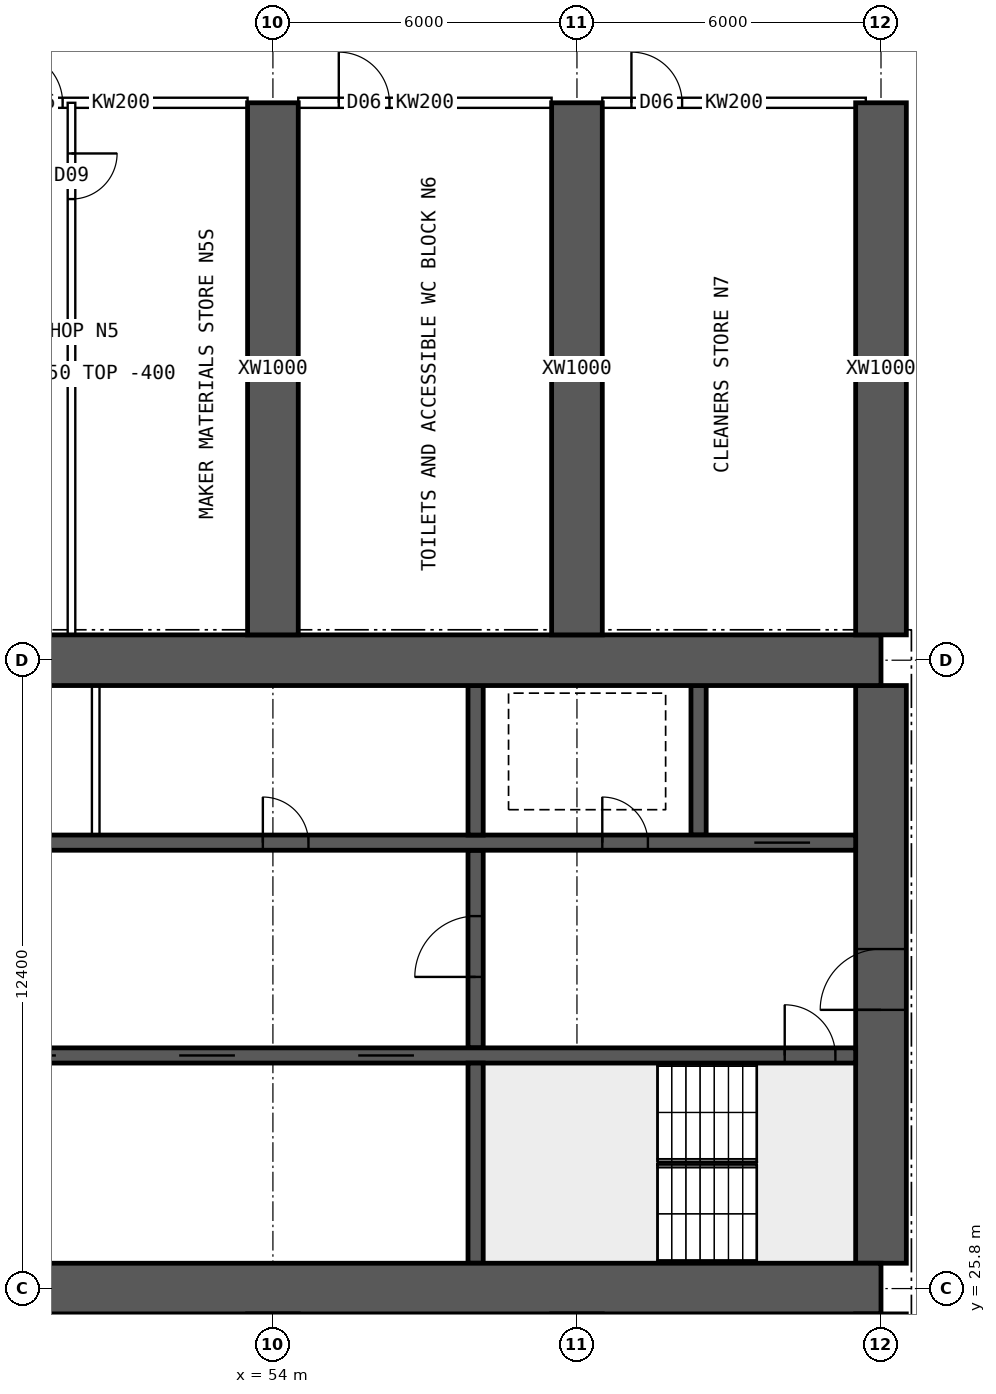
"""IFC4 building model, lengths in metres.
Left out: names, types, materials, properties, quantities, classifications, styles, units other than length and angle.
Written with IfcOpenShell. Run it as: python <this file> out.ifc"""

import sys

from ifc_helpers import new_model, si_unit, direction, frame, frame_2d, origin, place, context, subcontext, project, spatial, rectangle, extrude, element, fill, save


model = new_model("IFC4")
c1 = context("Model", 3, precision=1e-05, world=origin(), true_north=direction((0.0, 1.0)))
c2 = subcontext(c1, "Body", "Model", "MODEL_VIEW")
j1 = project(units=[si_unit("LENGTHUNIT", "METRE"), si_unit("PLANEANGLEUNIT", "RADIAN")], contexts=[c1])
p1 = place(None, origin())
s1 = spatial("IfcSite", under=j1, at=p1, CompositionType="ELEMENT")
p2 = place(p1, origin())
s2 = spatial("IfcBuilding", under=s1, at=p2, CompositionType="ELEMENT")
p3 = place(p2, frame((0.0, 0.0, 11.0)))
s3 = spatial("IfcBuildingStorey", under=s2, at=p3, CompositionType="ELEMENT", Elevation=11.0)
for number, where, z_axis, x_axis in (
    (1, (18.0, 25.8, 0.0), (0.0, 0.0, 1.0), (1.0, 0.0, 0.0)),
    (2, (18.0, 38.2, 0.0), (0.0, 0.0, 1.0), (1.0, 0.0, 0.0)),
):
    element("IfcWall", number, at=place(p3, frame(where, z_axis=z_axis, x_axis=x_axis)), inside=s3, PredefinedType="SHEAR", context=c2, shape_type="SweptSolid", body=[
        extrude(rectangle(XDim=48.0, YDim=1.0, at=frame_2d((24.0, 0.0))), origin(), (0.0, 0.0, 1.0), 5.0),
    ])
p4 = place(p3, frame((66.0, 26.3, 0.0), z_axis=(0.0, 0.0, 1.0), x_axis=(0.0, 1.0, 0.0)))
e3 = element("IfcWall", 3, at=p4, inside=s3, PredefinedType="SHEAR", context=c2, shape_type="SweptSolid", body=[
    extrude(rectangle(XDim=11.4, YDim=1.0, at=frame_2d((5.7, 0.0))), origin(), (0.0, 0.0, 1.0), 5.0),
])
p5 = place(p4, frame((5.0, 0.0, 0.0)))
e4 = element("IfcOpeningElement", 4, at=p5, cuts=e3, PredefinedType="OPENING", context=c2, shape_type="SweptSolid", body=[
    extrude(rectangle(XDim=1.2, YDim=2.1, at=frame_2d((0.6, 1.05))), frame((0.0, 0.51, 0.0), z_axis=(0.0, -1.0, 0.0), x_axis=(1.0, 0.0, 0.0)), (0.0, 0.0, 1.0), 1.02),
])
p6 = place(p3, frame((18.5, 30.4, 0.0), z_axis=(0.0, 0.0, 1.0), x_axis=(1.0, 0.0, 0.0)))
e5 = element("IfcWall", 5, at=p6, inside=s3, PredefinedType="SHEAR", context=c2, shape_type="SweptSolid", body=[
    extrude(rectangle(XDim=47.0, YDim=0.3, at=frame_2d((23.5, 0.0))), origin(), (0.0, 0.0, 1.0), 5.0),
])
p7 = place(p6, frame((0.4, 0.0, 0.0)))
e6 = element("IfcOpeningElement", 6, at=p7, cuts=e5, PredefinedType="OPENING", context=c2, shape_type="SweptSolid", body=[
    extrude(rectangle(XDim=1.0, YDim=2.1, at=frame_2d((0.5, 1.05))), frame((0.0, 0.16, 0.0), z_axis=(0.0, -1.0, 0.0), x_axis=(1.0, 0.0, 0.0)), (0.0, 0.0, 1.0), 0.32),
])
p8 = place(p6, frame((45.6, 0.0, 0.0)))
e7 = element("IfcOpeningElement", 7, at=p8, cuts=e5, PredefinedType="OPENING", context=c2, shape_type="SweptSolid", body=[
    extrude(rectangle(XDim=1.0, YDim=2.1, at=frame_2d((0.5, 1.05))), frame((0.0, 0.16, 0.0), z_axis=(0.0, -1.0, 0.0), x_axis=(1.0, 0.0, 0.0)), (0.0, 0.0, 1.0), 0.32),
])
p9 = place(p6, frame((8.25, 0.0, 0.0)))
e8 = element("IfcOpeningElement", 8, at=p9, cuts=e5, PredefinedType="OPENING", context=c2, shape_type="SweptSolid", body=[
    extrude(rectangle(XDim=1.1, YDim=2.1, at=frame_2d((0.55, 1.05))), frame((0.0, 0.16, 0.0), z_axis=(0.0, -1.0, 0.0), x_axis=(1.0, 0.0, 0.0)), (0.0, 0.0, 1.0), 0.32),
])
p10 = place(p6, frame((10.85, 0.0, 0.0)))
e9 = element("IfcOpeningElement", 9, at=p10, cuts=e5, PredefinedType="OPENING", context=c2, shape_type="SweptSolid", body=[
    extrude(rectangle(XDim=1.1, YDim=2.1, at=frame_2d((0.55, 1.05))), frame((0.0, 0.16, 0.0), z_axis=(0.0, -1.0, 0.0), x_axis=(1.0, 0.0, 0.0)), (0.0, 0.0, 1.0), 0.32),
])
p11 = place(p6, frame((13.45, 0.0, 0.0)))
e10 = element("IfcOpeningElement", 10, at=p11, cuts=e5, PredefinedType="OPENING", context=c2, shape_type="SweptSolid", body=[
    extrude(rectangle(XDim=1.1, YDim=2.1, at=frame_2d((0.55, 1.05))), frame((0.0, 0.16, 0.0), z_axis=(0.0, -1.0, 0.0), x_axis=(1.0, 0.0, 0.0)), (0.0, 0.0, 1.0), 0.32),
])
p12 = place(p6, frame((16.05, 0.0, 0.0)))
e11 = element("IfcOpeningElement", 11, at=p12, cuts=e5, PredefinedType="OPENING", context=c2, shape_type="SweptSolid", body=[
    extrude(rectangle(XDim=1.1, YDim=2.1, at=frame_2d((0.55, 1.05))), frame((0.0, 0.16, 0.0), z_axis=(0.0, -1.0, 0.0), x_axis=(1.0, 0.0, 0.0)), (0.0, 0.0, 1.0), 0.32),
])
p13 = place(p6, frame((30.117, 0.0, 0.0)))
e12 = element("IfcOpeningElement", 12, at=p13, cuts=e5, PredefinedType="OPENING", context=c2, shape_type="SweptSolid", body=[
    extrude(rectangle(XDim=1.1, YDim=2.1, at=frame_2d((0.55, 1.05))), frame((0.0, 0.16, 0.0), z_axis=(0.0, -1.0, 0.0), x_axis=(1.0, 0.0, 0.0)), (0.0, 0.0, 1.0), 0.32),
])
p14 = place(p6, frame((33.65, 0.0, 0.0)))
e13 = element("IfcOpeningElement", 13, at=p14, cuts=e5, PredefinedType="OPENING", context=c2, shape_type="SweptSolid", body=[
    extrude(rectangle(XDim=1.1, YDim=2.1, at=frame_2d((0.55, 1.05))), frame((0.0, 0.16, 0.0), z_axis=(0.0, -1.0, 0.0), x_axis=(1.0, 0.0, 0.0)), (0.0, 0.0, 1.0), 0.32),
])
p15 = place(p6, frame((37.183, 0.0, 0.0)))
e14 = element("IfcOpeningElement", 14, at=p15, cuts=e5, PredefinedType="OPENING", context=c2, shape_type="SweptSolid", body=[
    extrude(rectangle(XDim=1.1, YDim=2.1, at=frame_2d((0.55, 1.05))), frame((0.0, 0.16, 0.0), z_axis=(0.0, -1.0, 0.0), x_axis=(1.0, 0.0, 0.0)), (0.0, 0.0, 1.0), 0.32),
])
p16 = place(p3, frame((18.5, 34.6, 0.0), z_axis=(0.0, 0.0, 1.0), x_axis=(1.0, 0.0, 0.0)))
e15 = element("IfcWall", 15, at=p16, inside=s3, PredefinedType="SHEAR", context=c2, shape_type="SweptSolid", body=[
    extrude(rectangle(XDim=47.0, YDim=0.3, at=frame_2d((23.5, 0.0))), origin(), (0.0, 0.0, 1.0), 5.0),
])
p17 = place(p16, frame((0.9, 0.0, 0.0)))
e16 = element("IfcOpeningElement", 16, at=p17, cuts=e15, PredefinedType="OPENING", context=c2, shape_type="SweptSolid", body=[
    extrude(rectangle(XDim=1.1, YDim=2.1, at=frame_2d((0.55, 1.05))), frame((0.0, 0.16, 0.0), z_axis=(0.0, -1.0, 0.0), x_axis=(1.0, 0.0, 0.0)), (0.0, 0.0, 1.0), 0.32),
])
p18 = place(p16, frame((45.0, 0.0, 0.0)))
e17 = element("IfcOpeningElement", 17, at=p18, cuts=e15, PredefinedType="OPENING", context=c2, shape_type="SweptSolid", body=[
    extrude(rectangle(XDim=1.1, YDim=2.1, at=frame_2d((0.55, 1.05))), frame((0.0, 0.16, 0.0), z_axis=(0.0, -1.0, 0.0), x_axis=(1.0, 0.0, 0.0)), (0.0, 0.0, 1.0), 0.32),
])
p19 = place(p16, frame((4.1, 0.0, 0.0)))
e18 = element("IfcOpeningElement", 18, at=p19, cuts=e15, PredefinedType="OPENING", context=c2, shape_type="SweptSolid", body=[
    extrude(rectangle(XDim=0.9, YDim=2.1, at=frame_2d((0.45, 1.05))), frame((0.0, 0.16, 0.0), z_axis=(0.0, -1.0, 0.0), x_axis=(1.0, 0.0, 0.0)), (0.0, 0.0, 1.0), 0.32),
])
p20 = place(p16, frame((42.0, 0.0, 0.0)))
e19 = element("IfcOpeningElement", 19, at=p20, cuts=e15, PredefinedType="OPENING", context=c2, shape_type="SweptSolid", body=[
    extrude(rectangle(XDim=0.9, YDim=2.1, at=frame_2d((0.45, 1.05))), frame((0.0, 0.16, 0.0), z_axis=(0.0, -1.0, 0.0), x_axis=(1.0, 0.0, 0.0)), (0.0, 0.0, 1.0), 0.32),
])
p21 = place(p16, frame((8.875, 0.0, 0.0)))
e20 = element("IfcOpeningElement", 20, at=p21, cuts=e15, PredefinedType="OPENING", context=c2, shape_type="SweptSolid", body=[
    extrude(rectangle(XDim=0.9, YDim=2.1, at=frame_2d((0.45, 1.05))), frame((0.0, 0.16, 0.0), z_axis=(0.0, -1.0, 0.0), x_axis=(1.0, 0.0, 0.0)), (0.0, 0.0, 1.0), 0.32),
])
p22 = place(p16, frame((12.849, 0.0, 0.0)))
e21 = element("IfcOpeningElement", 21, at=p22, cuts=e15, PredefinedType="OPENING", context=c2, shape_type="SweptSolid", body=[
    extrude(rectangle(XDim=0.9, YDim=2.1, at=frame_2d((0.45, 1.05))), frame((0.0, 0.16, 0.0), z_axis=(0.0, -1.0, 0.0), x_axis=(1.0, 0.0, 0.0)), (0.0, 0.0, 1.0), 0.32),
])
p23 = place(p16, frame((16.496, 0.0, 0.0)))
e22 = element("IfcOpeningElement", 22, at=p23, cuts=e15, PredefinedType="OPENING", context=c2, shape_type="SweptSolid", body=[
    extrude(rectangle(XDim=0.9, YDim=2.1, at=frame_2d((0.45, 1.05))), frame((0.0, 0.16, 0.0), z_axis=(0.0, -1.0, 0.0), x_axis=(1.0, 0.0, 0.0)), (0.0, 0.0, 1.0), 0.32),
])
p24 = place(p16, frame((20.255, 0.0, 0.0)))
e23 = element("IfcOpeningElement", 23, at=p24, cuts=e15, PredefinedType="OPENING", context=c2, shape_type="SweptSolid", body=[
    extrude(rectangle(XDim=0.9, YDim=2.1, at=frame_2d((0.45, 1.05))), frame((0.0, 0.16, 0.0), z_axis=(0.0, -1.0, 0.0), x_axis=(1.0, 0.0, 0.0)), (0.0, 0.0, 1.0), 0.32),
])
p25 = place(p16, frame((24.661, 0.0, 0.0)))
e24 = element("IfcOpeningElement", 24, at=p25, cuts=e15, PredefinedType="OPENING", context=c2, shape_type="SweptSolid", body=[
    extrude(rectangle(XDim=0.9, YDim=2.1, at=frame_2d((0.45, 1.05))), frame((0.0, 0.16, 0.0), z_axis=(0.0, -1.0, 0.0), x_axis=(1.0, 0.0, 0.0)), (0.0, 0.0, 1.0), 0.32),
])
p26 = place(p16, frame((27.458, 0.0, 0.0)))
e25 = element("IfcOpeningElement", 25, at=p26, cuts=e15, PredefinedType="OPENING", context=c2, shape_type="SweptSolid", body=[
    extrude(rectangle(XDim=0.9, YDim=2.1, at=frame_2d((0.45, 1.05))), frame((0.0, 0.16, 0.0), z_axis=(0.0, -1.0, 0.0), x_axis=(1.0, 0.0, 0.0)), (0.0, 0.0, 1.0), 0.32),
])
p27 = place(p16, frame((29.831, 0.0, 0.0)))
e26 = element("IfcOpeningElement", 26, at=p27, cuts=e15, PredefinedType="OPENING", context=c2, shape_type="SweptSolid", body=[
    extrude(rectangle(XDim=0.9, YDim=2.1, at=frame_2d((0.45, 1.05))), frame((0.0, 0.16, 0.0), z_axis=(0.0, -1.0, 0.0), x_axis=(1.0, 0.0, 0.0)), (0.0, 0.0, 1.0), 0.32),
])
p28 = place(p16, frame((35.302, 0.0, 0.0)))
e27 = element("IfcOpeningElement", 27, at=p28, cuts=e15, PredefinedType="OPENING", context=c2, shape_type="SweptSolid", body=[
    extrude(rectangle(XDim=0.9, YDim=2.1, at=frame_2d((0.45, 1.05))), frame((0.0, 0.16, 0.0), z_axis=(0.0, -1.0, 0.0), x_axis=(1.0, 0.0, 0.0)), (0.0, 0.0, 1.0), 0.32),
])
p29 = place(p3, frame((58.0, 26.3, 0.0), z_axis=(0.0, 0.0, 1.0), x_axis=(0.0, 1.0, 0.0)))
e28 = element("IfcWall", 28, at=p29, inside=s3, PredefinedType="SHEAR", context=c2, shape_type="SweptSolid", body=[
    extrude(rectangle(XDim=3.95, YDim=0.3, at=frame_2d((1.975, 0.0))), origin(), (0.0, 0.0, 1.0), 5.0),
])
p30 = place(p3, frame((58.0, 30.55, 0.0), z_axis=(0.0, 0.0, 1.0), x_axis=(0.0, 1.0, 0.0)))
e29 = element("IfcWall", 29, at=p30, inside=s3, PredefinedType="SHEAR", context=c2, shape_type="SweptSolid", body=[
    extrude(rectangle(XDim=3.9, YDim=0.3, at=frame_2d((1.95, 0.0))), origin(), (0.0, 0.0, 1.0), 5.0),
])
p31 = place(p30, frame((1.4, 0.0, 0.0)))
e30 = element("IfcOpeningElement", 30, at=p31, cuts=e29, PredefinedType="OPENING", context=c2, shape_type="SweptSolid", body=[
    extrude(rectangle(XDim=1.2, YDim=2.1, at=frame_2d((0.6, 1.05))), frame((0.0, 0.16, 0.0), z_axis=(0.0, -1.0, 0.0), x_axis=(1.0, 0.0, 0.0)), (0.0, 0.0, 1.0), 0.32),
])
for number, where, z_axis, x_axis in (
    (31, (62.4, 34.75, 0.0), (0.0, 0.0, 1.0), (0.0, 1.0, 0.0)),
    (32, (58.0, 34.75, 0.0), (0.0, 0.0, 1.0), (0.0, 1.0, 0.0)),
):
    element("IfcWall", number, at=place(p3, frame(where, z_axis=z_axis, x_axis=x_axis)), inside=s3, PredefinedType="SHEAR", context=c2, shape_type="SweptSolid", body=[
        extrude(rectangle(XDim=2.95, YDim=0.3, at=frame_2d((1.475, 0.0))), origin(), (0.0, 0.0, 1.0), 5.0),
    ])
for number, where, z_axis, x_axis in (
    (33, (54.0, 38.7, 0.0), (0.0, 0.0, 1.0), (0.0, 1.0, 0.0)),
    (34, (60.0, 38.7, 0.0), (0.0, 0.0, 1.0), (0.0, 1.0, 0.0)),
    (35, (66.0, 38.7, 0.0), (0.0, 0.0, 1.0), (0.0, 1.0, 0.0)),
):
    element("IfcWall", number, at=place(p3, frame(where, z_axis=z_axis, x_axis=x_axis)), inside=s3, PredefinedType="SHEAR", context=c2, shape_type="SweptSolid", body=[
        extrude(rectangle(XDim=10.5, YDim=1.0, at=frame_2d((5.25, 0.0))), origin(), (0.0, 0.0, 1.0), 5.0),
    ])
p32 = place(p3, frame((50.503, 34.75, 0.0), z_axis=(0.0, 0.0, 1.0), x_axis=(0.0, 1.0, 0.0)))
e36 = element("IfcWall", 36, at=p32, inside=s3, PredefinedType="SOLIDWALL", context=c2, shape_type="SweptSolid", body=[
    extrude(rectangle(XDim=2.95, YDim=0.15, at=frame_2d((1.475, 0.0))), origin(), (0.0, 0.0, 1.0), 4.6),
])
p33 = place(p3, frame((51.825, 14.8, 0.0), z_axis=(0.0, 0.0, 1.0), x_axis=(0.0, 1.0, 0.0)))
e37 = element("IfcWall", 37, at=p33, inside=s3, PredefinedType="PARTITIONING", context=c2, shape_type="SweptSolid", body=[
    extrude(rectangle(XDim=10.7, YDim=0.15, at=frame_2d((5.35, 0.0))), origin(), (0.0, 0.0, 1.0), 4.6),
])
p34 = place(p33, frame((1.0, 0.0, 0.0)))
e38 = element("IfcOpeningElement", 38, at=p34, cuts=e37, PredefinedType="OPENING", context=c2, shape_type="SweptSolid", body=[
    extrude(rectangle(XDim=0.9, YDim=2.1, at=frame_2d((0.45, 1.05))), frame((0.0, 0.085, 0.0), z_axis=(0.0, -1.0, 0.0), x_axis=(1.0, 0.0, 0.0)), (0.0, 0.0, 1.0), 0.17),
])
p35 = place(p3, frame((57.15, 14.8, 0.0), z_axis=(0.0, 0.0, 1.0), x_axis=(0.0, 1.0, 0.0)))
e39 = element("IfcWall", 39, at=p35, inside=s3, PredefinedType="PARTITIONING", context=c2, shape_type="SweptSolid", body=[
    extrude(rectangle(XDim=10.7, YDim=0.15, at=frame_2d((5.35, 0.0))), origin(), (0.0, 0.0, 1.0), 4.6),
])
p36 = place(p35, frame((1.0, 0.0, 0.0)))
e40 = element("IfcOpeningElement", 40, at=p36, cuts=e39, PredefinedType="OPENING", context=c2, shape_type="SweptSolid", body=[
    extrude(rectangle(XDim=0.9, YDim=2.1, at=frame_2d((0.45, 1.05))), frame((0.0, 0.085, 0.0), z_axis=(0.0, -1.0, 0.0), x_axis=(1.0, 0.0, 0.0)), (0.0, 0.0, 1.0), 0.17),
])
p37 = place(p3, frame((50.025, 38.5, 0.0), z_axis=(0.0, 0.0, 1.0), x_axis=(0.0, 1.0, 0.0)))
e41 = element("IfcWall", 41, at=p37, inside=s3, PredefinedType="PARTITIONING", context=c2, shape_type="SweptSolid", body=[
    extrude(rectangle(XDim=10.7, YDim=0.15, at=frame_2d((5.35, 0.0))), origin(), (0.0, 0.0, 1.0), 4.6),
])
p38 = place(p37, frame((8.8, 0.0, 0.0)))
e42 = element("IfcOpeningElement", 42, at=p38, cuts=e41, PredefinedType="OPENING", context=c2, shape_type="SweptSolid", body=[
    extrude(rectangle(XDim=0.9, YDim=2.1, at=frame_2d((0.45, 1.05))), frame((0.0, 0.085, 0.0), z_axis=(0.0, -1.0, 0.0), x_axis=(1.0, 0.0, 0.0)), (0.0, 0.0, 1.0), 0.17),
])
p39 = place(p3, frame((48.5, 49.2, 0.0), z_axis=(0.0, 0.0, 1.0), x_axis=(1.0, 0.0, 0.0)))
e43 = element("IfcWall", 43, at=p39, inside=s3, PredefinedType="SOLIDWALL", context=c2, shape_type="SweptSolid", body=[
    extrude(rectangle(XDim=5.0, YDim=0.2, at=frame_2d((2.5, 0.0))), origin(), (0.0, 0.0, 1.0), 4.6),
])
p40 = place(p39, frame((0.35, 0.0, 0.0)))
e44 = element("IfcOpeningElement", 44, at=p40, cuts=e43, PredefinedType="OPENING", context=c2, shape_type="SweptSolid", body=[
    extrude(rectangle(XDim=1.0, YDim=2.1, at=frame_2d((0.5, 1.05))), frame((0.0, 0.11, 0.0), z_axis=(0.0, -1.0, 0.0), x_axis=(1.0, 0.0, 0.0)), (0.0, 0.0, 1.0), 0.22),
])
p41 = place(p3, frame((54.5, 49.2, 0.0), z_axis=(0.0, 0.0, 1.0), x_axis=(1.0, 0.0, 0.0)))
e45 = element("IfcWall", 45, at=p41, inside=s3, PredefinedType="SOLIDWALL", context=c2, shape_type="SweptSolid", body=[
    extrude(rectangle(XDim=5.0, YDim=0.2, at=frame_2d((2.5, 0.0))), origin(), (0.0, 0.0, 1.0), 4.6),
])
p42 = place(p41, frame((0.8, 0.0, 0.0)))
e46 = element("IfcOpeningElement", 46, at=p42, cuts=e45, PredefinedType="OPENING", context=c2, shape_type="SweptSolid", body=[
    extrude(rectangle(XDim=1.0, YDim=2.1, at=frame_2d((0.5, 1.05))), frame((0.0, 0.11, 0.0), z_axis=(0.0, -1.0, 0.0), x_axis=(1.0, 0.0, 0.0)), (0.0, 0.0, 1.0), 0.22),
])
p43 = place(p3, frame((60.5, 49.2, 0.0), z_axis=(0.0, 0.0, 1.0), x_axis=(1.0, 0.0, 0.0)))
e47 = element("IfcWall", 47, at=p43, inside=s3, PredefinedType="SOLIDWALL", context=c2, shape_type="SweptSolid", body=[
    extrude(rectangle(XDim=5.2, YDim=0.2, at=frame_2d((2.6, 0.0))), origin(), (0.0, 0.0, 1.0), 4.6),
])
p44 = place(p43, frame((0.575, 0.0, 0.0)))
e48 = element("IfcOpeningElement", 48, at=p44, cuts=e47, PredefinedType="OPENING", context=c2, shape_type="SweptSolid", body=[
    extrude(rectangle(XDim=1.0, YDim=2.1, at=frame_2d((0.5, 1.05))), frame((0.0, 0.11, 0.0), z_axis=(0.0, -1.0, 0.0), x_axis=(1.0, 0.0, 0.0)), (0.0, 0.0, 1.0), 0.22),
])
p45 = place(p5, origin())
e49 = element("IfcDoor", 49, at=p45, inside=s3, OperationType="SINGLE_SWING_LEFT", PredefinedType="DOOR", context=c2, shape_type="SweptSolid", body=[
    extrude(rectangle(XDim=1.2, YDim=2.1, at=frame_2d((0.6, 1.05))), frame((0.0, 0.025, 0.0), z_axis=(0.0, -1.0, 0.0), x_axis=(1.0, 0.0, 0.0)), (0.0, 0.0, 1.0), 0.05),
])
fill(e4, e49)
p46 = place(p8, origin())
e50 = element("IfcDoor", 50, at=p46, inside=s3, OperationType="SINGLE_SWING_LEFT", PredefinedType="DOOR", context=c2, shape_type="SweptSolid", body=[
    extrude(rectangle(XDim=1.0, YDim=2.1, at=frame_2d((0.5, 1.05))), frame((0.0, 0.025, 0.0), z_axis=(0.0, -1.0, 0.0), x_axis=(1.0, 0.0, 0.0)), (0.0, 0.0, 1.0), 0.05),
])
fill(e7, e50)
p47 = place(p18, origin())
e51 = element("IfcDoor", 51, at=p47, inside=s3, OperationType="DOUBLE_DOOR_SLIDING", PredefinedType="DOOR", context=c2, shape_type="SweptSolid", body=[
    extrude(rectangle(XDim=1.1, YDim=2.1, at=frame_2d((0.55, 1.05))), frame((0.0, 0.025, 0.0), z_axis=(0.0, -1.0, 0.0), x_axis=(1.0, 0.0, 0.0)), (0.0, 0.0, 1.0), 0.05),
])
fill(e17, e51)
p48 = place(p20, origin())
e52 = element("IfcDoor", 52, at=p48, inside=s3, OperationType="SINGLE_SWING_LEFT", PredefinedType="DOOR", context=c2, shape_type="SweptSolid", body=[
    extrude(rectangle(XDim=0.9, YDim=2.1, at=frame_2d((0.45, 1.05))), frame((0.0, 0.025, 0.0), z_axis=(0.0, -1.0, 0.0), x_axis=(1.0, 0.0, 0.0)), (0.0, 0.0, 1.0), 0.05),
])
fill(e19, e52)
p49 = place(p31, origin())
e53 = element("IfcDoor", 53, at=p49, inside=s3, OperationType="SINGLE_SWING_LEFT", PredefinedType="DOOR", context=c2, shape_type="SweptSolid", body=[
    extrude(rectangle(XDim=1.2, YDim=2.1, at=frame_2d((0.6, 1.05))), frame((0.0, 0.025, 0.0), z_axis=(0.0, -1.0, 0.0), x_axis=(1.0, 0.0, 0.0)), (0.0, 0.0, 1.0), 0.05),
])
fill(e30, e53)
p50 = place(p28, origin())
e54 = element("IfcDoor", 54, at=p50, inside=s3, OperationType="SINGLE_SWING_LEFT", PredefinedType="DOOR", context=c2, shape_type="SweptSolid", body=[
    extrude(rectangle(XDim=0.9, YDim=2.1, at=frame_2d((0.45, 1.05))), frame((0.0, 0.025, 0.0), z_axis=(0.0, -1.0, 0.0), x_axis=(1.0, 0.0, 0.0)), (0.0, 0.0, 1.0), 0.05),
])
fill(e27, e54)
p51 = place(p13, origin())
e55 = element("IfcDoor", 55, at=p51, inside=s3, OperationType="DOUBLE_DOOR_SLIDING", PredefinedType="DOOR", context=c2, shape_type="SweptSolid", body=[
    extrude(rectangle(XDim=1.1, YDim=2.1, at=frame_2d((0.55, 1.05))), frame((0.0, 0.025, 0.0), z_axis=(0.0, -1.0, 0.0), x_axis=(1.0, 0.0, 0.0)), (0.0, 0.0, 1.0), 0.05),
])
fill(e12, e55)
p52 = place(p14, origin())
e56 = element("IfcDoor", 56, at=p52, inside=s3, OperationType="DOUBLE_DOOR_SLIDING", PredefinedType="DOOR", context=c2, shape_type="SweptSolid", body=[
    extrude(rectangle(XDim=1.1, YDim=2.1, at=frame_2d((0.55, 1.05))), frame((0.0, 0.025, 0.0), z_axis=(0.0, -1.0, 0.0), x_axis=(1.0, 0.0, 0.0)), (0.0, 0.0, 1.0), 0.05),
])
fill(e13, e56)
p53 = place(p15, origin())
e57 = element("IfcDoor", 57, at=p53, inside=s3, OperationType="DOUBLE_DOOR_SLIDING", PredefinedType="DOOR", context=c2, shape_type="SweptSolid", body=[
    extrude(rectangle(XDim=1.1, YDim=2.1, at=frame_2d((0.55, 1.05))), frame((0.0, 0.025, 0.0), z_axis=(0.0, -1.0, 0.0), x_axis=(1.0, 0.0, 0.0)), (0.0, 0.0, 1.0), 0.05),
])
fill(e14, e57)
p54 = place(p38, origin())
e58 = element("IfcDoor", 58, at=p54, inside=s3, OperationType="SINGLE_SWING_RIGHT", PredefinedType="DOOR", context=c2, shape_type="SweptSolid", body=[
    extrude(rectangle(XDim=0.9, YDim=2.1, at=frame_2d((0.45, 1.05))), frame((0.0, 0.025, 0.0), z_axis=(0.0, -1.0, 0.0), x_axis=(1.0, 0.0, 0.0)), (0.0, 0.0, 1.0), 0.05),
])
fill(e42, e58)
p55 = place(p40, origin())
e59 = element("IfcDoor", 59, at=p55, inside=s3, OperationType="SINGLE_SWING_LEFT", PredefinedType="DOOR", context=c2, shape_type="SweptSolid", body=[
    extrude(rectangle(XDim=1.0, YDim=2.1, at=frame_2d((0.5, 1.05))), frame((0.0, 0.025, 0.0), z_axis=(0.0, -1.0, 0.0), x_axis=(1.0, 0.0, 0.0)), (0.0, 0.0, 1.0), 0.05),
])
fill(e44, e59)
p56 = place(p42, origin())
e60 = element("IfcDoor", 60, at=p56, inside=s3, OperationType="SINGLE_SWING_LEFT", PredefinedType="DOOR", context=c2, shape_type="SweptSolid", body=[
    extrude(rectangle(XDim=1.0, YDim=2.1, at=frame_2d((0.5, 1.05))), frame((0.0, 0.025, 0.0), z_axis=(0.0, -1.0, 0.0), x_axis=(1.0, 0.0, 0.0)), (0.0, 0.0, 1.0), 0.05),
])
fill(e46, e60)
p57 = place(p44, origin())
e61 = element("IfcDoor", 61, at=p57, inside=s3, OperationType="SINGLE_SWING_LEFT", PredefinedType="DOOR", context=c2, shape_type="SweptSolid", body=[
    extrude(rectangle(XDim=1.0, YDim=2.1, at=frame_2d((0.5, 1.05))), frame((0.0, 0.025, 0.0), z_axis=(0.0, -1.0, 0.0), x_axis=(1.0, 0.0, 0.0)), (0.0, 0.0, 1.0), 0.05),
])
fill(e48, e61)
save(model, sys.argv[1])
